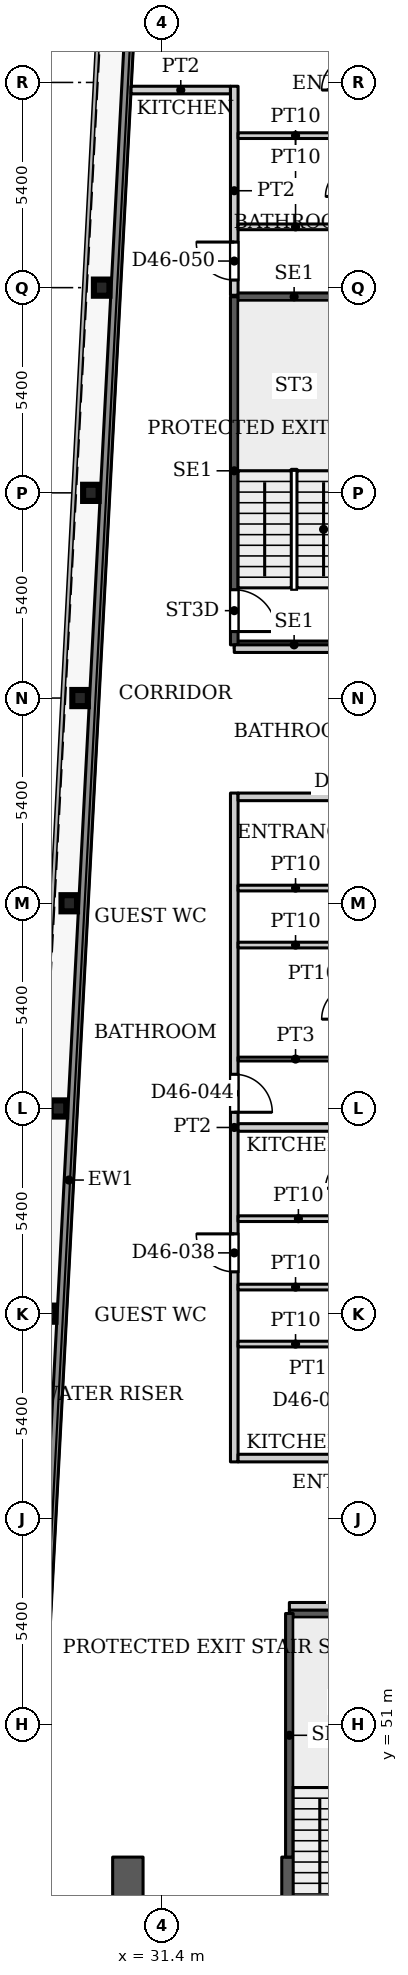
"""IFC4 building model, lengths in metres.
Left out: names, types, materials, properties, quantities, classifications, styles, units other than length and angle.
Written with IfcOpenShell. Run it as: python <this file> out.ifc"""

import sys

from ifc_helpers import new_model, si_unit, direction, frame, frame_2d, origin, origin_2d, place, context, subcontext, project, spatial, rectangle, i_section, extrude, source, transform, mapped, element, fill, save


model = new_model("IFC4")
c1 = context("Model", 3, precision=1e-05, world=origin(), true_north=direction((0.0, 1.0)))
c2 = subcontext(c1, "Body", "Model", "MODEL_VIEW")
j1 = project(units=[si_unit("LENGTHUNIT", "METRE"), si_unit("PLANEANGLEUNIT", "RADIAN")], contexts=[c1])
p1 = place(None, origin())
s1 = spatial("IfcSite", under=j1, at=p1, CompositionType="ELEMENT")
p2 = place(p1, origin())
s2 = spatial("IfcBuilding", under=s1, at=p2, CompositionType="ELEMENT")
p3 = place(p2, frame((0.0, 0.0, 195.5)))
s3 = spatial("IfcBuildingStorey", under=s2, at=p3, CompositionType="ELEMENT", Elevation=195.5)
for number, where, z_axis, x_axis in (
    (1, (28.39, 61.8, 0.0), (0.0, 0.0, 1.0), (1.0, 0.0, 0.0)),
    (2, (28.674, 67.2, 0.0), (0.0, 0.0, 1.0), (1.0, 0.0, 0.0)),
    (3, (28.958, 72.6, 0.0), (0.0, 0.0, 1.0), (1.0, 0.0, 0.0)),
    (4, (29.243, 78.0, 0.0), (0.0, 0.0, 1.0), (1.0, 0.0, 0.0)),
    (5, (29.527, 83.4, 0.0), (0.0, 0.0, 1.0), (1.0, 0.0, 0.0)),
    (6, (29.811, 88.8, 0.0), (0.0, 0.0, 1.0), (1.0, 0.0, 0.0)),
):
    element("IfcColumn", number, at=place(p3, frame(where, z_axis=z_axis, x_axis=x_axis)), inside=s3, PredefinedType="COLUMN", context=c2, shape_type="SweptSolid", body=[
        extrude(i_section(OverallWidth=0.409, OverallDepth=0.425, WebThickness=0.033, FlangeThickness=0.052, FilletRadius=0.013, at=origin_2d()), origin(), (0.0, 0.0, 1.0), 3.9),
    ])
p4 = place(p3, frame((34.75, 29.05, 0.0), z_axis=(0.0, 0.0, 1.0), x_axis=(0.0, 1.0, 0.0)))
e7 = element("IfcWall", 7, at=p4, inside=s3, PredefinedType="SHEAR", context=c2, shape_type="SweptSolid", body=[
    extrude(rectangle(XDim=18.45, YDim=0.4, at=frame_2d((9.225, 0.0))), origin(), (0.0, 0.0, 1.0), 3.9),
])
p5 = place(p4, frame((8.025, 0.0, 0.0)))
e8 = element("IfcOpeningElement", 8, at=p5, cuts=e7, PredefinedType="OPENING", context=c2, shape_type="SweptSolid", body=[
    extrude(rectangle(XDim=1.1, YDim=2.2, at=frame_2d((0.55, 1.1))), frame((0.0, 0.21, 0.0), z_axis=(0.0, -1.0, 0.0), x_axis=(1.0, 0.0, 0.0)), (0.0, 0.0, 1.0), 0.42),
])
p6 = place(p4, frame((10.875, 0.0, 0.0)))
e9 = element("IfcOpeningElement", 9, at=p6, cuts=e7, PredefinedType="OPENING", context=c2, shape_type="SweptSolid", body=[
    extrude(rectangle(XDim=1.1, YDim=2.2, at=frame_2d((0.55, 1.1))), frame((0.0, 0.21, 0.0), z_axis=(0.0, -1.0, 0.0), x_axis=(1.0, 0.0, 0.0)), (0.0, 0.0, 1.0), 0.42),
])
p7 = place(p4, frame((13.725, 0.0, 0.0)))
e10 = element("IfcOpeningElement", 10, at=p7, cuts=e7, PredefinedType="OPENING", context=c2, shape_type="SweptSolid", body=[
    extrude(rectangle(XDim=1.1, YDim=2.2, at=frame_2d((0.55, 1.1))), frame((0.0, 0.21, 0.0), z_axis=(0.0, -1.0, 0.0), x_axis=(1.0, 0.0, 0.0)), (0.0, 0.0, 1.0), 0.42),
])
p8 = place(p4, frame((15.95, 0.0, 0.0)))
e11 = element("IfcOpeningElement", 11, at=p8, cuts=e7, PredefinedType="OPENING", context=c2, shape_type="SweptSolid", body=[
    extrude(rectangle(XDim=1.1, YDim=2.2, at=frame_2d((0.55, 1.1))), frame((0.0, 0.21, 0.0), z_axis=(0.0, -1.0, 0.0), x_axis=(1.0, 0.0, 0.0)), (0.0, 0.0, 1.0), 0.42),
])
p9 = place(p3, frame((30.5, 29.05, 0.0), z_axis=(0.0, 0.0, 1.0), x_axis=(0.0, 1.0, 0.0)))
e12 = element("IfcWall", 12, at=p9, inside=s3, PredefinedType="SHEAR", context=c2, shape_type="SweptSolid", body=[
    extrude(rectangle(XDim=18.45, YDim=0.8, at=frame_2d((9.225, 0.0))), origin(), (0.0, 0.0, 1.0), 3.9),
])
p10 = place(p9, frame((1.5, 0.0, 0.0)))
e13 = element("IfcOpeningElement", 13, at=p10, cuts=e12, PredefinedType="OPENING", context=c2, shape_type="SweptSolid", body=[
    extrude(rectangle(XDim=0.9, YDim=2.2, at=frame_2d((0.45, 1.1))), frame((0.0, 0.41, 0.0), z_axis=(0.0, -1.0, 0.0), x_axis=(1.0, 0.0, 0.0)), (0.0, 0.0, 1.0), 0.82),
])
p11 = place(p9, frame((8.705, 0.0, 0.0)))
e14 = element("IfcOpeningElement", 14, at=p11, cuts=e12, PredefinedType="OPENING", context=c2, shape_type="SweptSolid", body=[
    extrude(rectangle(XDim=0.9, YDim=2.2, at=frame_2d((0.45, 1.1))), frame((0.0, 0.41, 0.0), z_axis=(0.0, -1.0, 0.0), x_axis=(1.0, 0.0, 0.0)), (0.0, 0.0, 1.0), 0.82),
])
p12 = place(p3, frame((27.195, 31.969, 0.0), z_axis=(0.0, 0.0, 1.0), x_axis=(0.052554995867, 0.998618031286, 0.0)))
e15 = element("IfcWall", 15, at=p12, inside=s3, PredefinedType="SOLIDWALL", context=c2, shape_type="SweptSolid", body=[
    extrude(rectangle(XDim=66.787, YDim=0.25, at=frame_2d((33.394, 0.0))), origin(), (0.0, 0.0, 1.0), 3.75),
])
p13 = place(p3, frame((34.75, 53.91, 0.0), z_axis=(0.0, 0.0, 1.0), x_axis=(1.0, 0.0, 0.0)))
e16 = element("IfcWall", 16, at=p13, inside=s3, PredefinedType="SHEAR", context=c2, shape_type="SweptSolid", body=[
    extrude(rectangle(XDim=3.15, YDim=0.2, at=frame_2d((1.575, 0.0))), origin(), (0.0, 0.0, 1.0), 3.9),
])
p14 = place(p3, frame((34.75, 47.5, 0.0), z_axis=(0.0, 0.0, 1.0), x_axis=(0.0, 1.0, 0.0)))
e17 = element("IfcWall", 17, at=p14, inside=s3, PredefinedType="SHEAR", context=c2, shape_type="SweptSolid", body=[
    extrude(rectangle(XDim=6.41, YDim=0.2, at=frame_2d((3.205, 0.0))), origin(), (0.0, 0.0, 1.0), 3.9),
])
for number, where, z_axis, x_axis in (
    (18, (33.3, 79.4, 0.0), (0.0, 0.0, 1.0), (1.0, 0.0, 0.0)),
    (19, (33.3, 88.56, 0.0), (0.0, 0.0, 1.0), (1.0, 0.0, 0.0)),
):
    element("IfcWall", number, at=place(p3, frame(where, z_axis=z_axis, x_axis=x_axis)), inside=s3, PredefinedType="SHEAR", context=c2, shape_type="SweptSolid", body=[
        extrude(rectangle(XDim=3.15, YDim=0.2, at=frame_2d((1.575, 0.0))), origin(), (0.0, 0.0, 1.0), 3.9),
    ])
p15 = place(p3, frame((33.3, 79.4, 0.0), z_axis=(0.0, 0.0, 1.0), x_axis=(0.0, 1.0, 0.0)))
e20 = element("IfcWall", 20, at=p15, inside=s3, PredefinedType="SHEAR", context=c2, shape_type="SweptSolid", body=[
    extrude(rectangle(XDim=9.16, YDim=0.2, at=frame_2d((4.58, 0.0))), origin(), (0.0, 0.0, 1.0), 3.9),
])
p16 = place(p15, frame((0.35, 0.0, 0.0)))
e21 = element("IfcOpeningElement", 21, at=p16, cuts=e20, PredefinedType="OPENING", context=c2, shape_type="SweptSolid", body=[
    extrude(rectangle(XDim=1.1, YDim=2.2, at=frame_2d((0.55, 1.1))), frame((0.0, 0.11, 0.0), z_axis=(0.0, -1.0, 0.0), x_axis=(1.0, 0.0, 0.0)), (0.0, 0.0, 1.0), 0.22),
])
p17 = place(p3, frame((30.585, 94.0, 0.0), z_axis=(0.0, 0.0, 1.0), x_axis=(1.0, 0.0, 0.0)))
e22 = element("IfcWall", 22, at=p17, inside=s3, PredefinedType="PARTITIONING", context=c2, shape_type="SweptSolid", body=[
    extrude(rectangle(XDim=2.615, YDim=0.2, at=frame_2d((1.308, 0.0))), origin(), (0.0, 0.0, 1.0), 3.6),
])
p18 = place(p3, frame((33.3, 57.9, 0.0), z_axis=(0.0, 0.0, 1.0), x_axis=(0.0, 1.0, 0.0)))
e23 = element("IfcWall", 23, at=p18, inside=s3, PredefinedType="PARTITIONING", context=c2, shape_type="SweptSolid", body=[
    extrude(rectangle(XDim=17.6, YDim=0.2, at=frame_2d((8.8, 0.0))), origin(), (0.0, 0.0, 1.0), 3.6),
])
p19 = place(p18, frame((5.0, 0.0, 0.0)))
e24 = element("IfcOpeningElement", 24, at=p19, cuts=e23, PredefinedType="OPENING", context=c2, shape_type="SweptSolid", body=[
    extrude(rectangle(XDim=1.0, YDim=2.1, at=frame_2d((0.5, 1.05))), frame((0.0, 0.11, 0.0), z_axis=(0.0, -1.0, 0.0), x_axis=(1.0, 0.0, 0.0)), (0.0, 0.0, 1.0), 0.22),
])
p20 = place(p18, frame((9.2, 0.0, 0.0)))
e25 = element("IfcOpeningElement", 25, at=p20, cuts=e23, PredefinedType="OPENING", context=c2, shape_type="SweptSolid", body=[
    extrude(rectangle(XDim=1.0, YDim=2.1, at=frame_2d((0.5, 1.05))), frame((0.0, 0.11, 0.0), z_axis=(0.0, -1.0, 0.0), x_axis=(1.0, 0.0, 0.0)), (0.0, 0.0, 1.0), 0.22),
])
p21 = place(p3, frame((33.3, 79.3, 0.0), z_axis=(0.0, 0.0, 1.0), x_axis=(1.0, 0.0, 0.0)))
e26 = element("IfcWall", 26, at=p21, inside=s3, PredefinedType="PARTITIONING", context=c2, shape_type="SweptSolid", body=[
    extrude(rectangle(XDim=12.6, YDim=0.2, at=frame_2d((6.3, 0.0))), origin(), (0.0, 0.0, 1.0), 3.6),
])
p22 = place(p21, frame((5.795, 0.0, 0.0)))
e27 = element("IfcOpeningElement", 27, at=p22, cuts=e26, PredefinedType="OPENING", context=c2, shape_type="SweptSolid", body=[
    extrude(rectangle(XDim=1.0, YDim=2.1, at=frame_2d((0.5, 1.05))), frame((0.0, 0.11, 0.0), z_axis=(0.0, -1.0, 0.0), x_axis=(1.0, 0.0, 0.0)), (0.0, 0.0, 1.0), 0.22),
])
p23 = place(p3, frame((33.3, 88.6, 0.0), z_axis=(0.0, 0.0, 1.0), x_axis=(0.0, 1.0, 0.0)))
e28 = element("IfcWall", 28, at=p23, inside=s3, PredefinedType="PARTITIONING", context=c2, shape_type="SweptSolid", body=[
    extrude(rectangle(XDim=5.5, YDim=0.2, at=frame_2d((2.75, 0.0))), origin(), (0.0, 0.0, 1.0), 3.6),
])
p24 = place(p23, frame((0.4, 0.0, 0.0)))
e29 = element("IfcOpeningElement", 29, at=p24, cuts=e28, PredefinedType="OPENING", context=c2, shape_type="SweptSolid", body=[
    extrude(rectangle(XDim=1.0, YDim=2.1, at=frame_2d((0.5, 1.05))), frame((0.0, 0.11, 0.0), z_axis=(0.0, -1.0, 0.0), x_axis=(1.0, 0.0, 0.0)), (0.0, 0.0, 1.0), 0.22),
])
p25 = place(p3, frame((33.4, 58.0, 0.0), z_axis=(0.0, 0.0, 1.0), x_axis=(1.0, 0.0, 0.0)))
e30 = element("IfcWall", 30, at=p25, inside=s3, PredefinedType="PARTITIONING", context=c2, shape_type="SweptSolid", body=[
    extrude(rectangle(XDim=12.5, YDim=0.2, at=frame_2d((6.25, 0.0))), origin(), (0.0, 0.0, 1.0), 3.6),
])
for number, where, z_axis, x_axis in (
    (31, (33.4, 61.0, 0.0), (0.0, 0.0, 1.0), (1.0, 0.0, 0.0)),
    (32, (33.4, 62.5, 0.0), (0.0, 0.0, 1.0), (1.0, 0.0, 0.0)),
):
    element("IfcWall", number, at=place(p3, frame(where, z_axis=z_axis, x_axis=x_axis)), inside=s3, PredefinedType="PARTITIONING", context=c2, shape_type="SweptSolid", body=[
        extrude(rectangle(XDim=3.025, YDim=0.15, at=frame_2d((1.513, 0.0))), origin(), (0.0, 0.0, 1.0), 3.6),
    ])
p26 = place(p3, frame((33.4, 64.3, 0.0), z_axis=(0.0, 0.0, 1.0), x_axis=(1.0, 0.0, 0.0)))
e33 = element("IfcWall", 33, at=p26, inside=s3, PredefinedType="PARTITIONING", context=c2, shape_type="SweptSolid", body=[
    extrude(rectangle(XDim=3.175, YDim=0.15, at=frame_2d((1.587, 0.0))), origin(), (0.0, 0.0, 1.0), 3.6),
])
p27 = place(p3, frame((33.4, 66.7, 0.0), z_axis=(0.0, 0.0, 1.0), x_axis=(1.0, 0.0, 0.0)))
e34 = element("IfcWall", 34, at=p27, inside=s3, PredefinedType="PARTITIONING", context=c2, shape_type="SweptSolid", body=[
    extrude(rectangle(XDim=12.5, YDim=0.2, at=frame_2d((6.25, 0.0))), origin(), (0.0, 0.0, 1.0), 3.6),
])
p28 = place(p3, frame((33.4, 68.5, 0.0), z_axis=(0.0, 0.0, 1.0), x_axis=(1.0, 0.0, 0.0)))
e35 = element("IfcWall", 35, at=p28, inside=s3, PredefinedType="PARTITIONING", context=c2, shape_type="SweptSolid", body=[
    extrude(rectangle(XDim=3.025, YDim=0.1, at=frame_2d((1.513, 0.0))), origin(), (0.0, 0.0, 1.0), 3.6),
])
for number, where, z_axis, x_axis in (
    (36, (33.4, 71.5, 0.0), (0.0, 0.0, 1.0), (1.0, 0.0, 0.0)),
    (37, (33.4, 73.0, 0.0), (0.0, 0.0, 1.0), (1.0, 0.0, 0.0)),
):
    element("IfcWall", number, at=place(p3, frame(where, z_axis=z_axis, x_axis=x_axis)), inside=s3, PredefinedType="PARTITIONING", context=c2, shape_type="SweptSolid", body=[
        extrude(rectangle(XDim=3.025, YDim=0.15, at=frame_2d((1.513, 0.0))), origin(), (0.0, 0.0, 1.0), 3.6),
    ])
p29 = place(p3, frame((33.4, 75.4, 0.0), z_axis=(0.0, 0.0, 1.0), x_axis=(1.0, 0.0, 0.0)))
e38 = element("IfcWall", 38, at=p29, inside=s3, PredefinedType="PARTITIONING", context=c2, shape_type="SweptSolid", body=[
    extrude(rectangle(XDim=12.5, YDim=0.2, at=frame_2d((6.25, 0.0))), origin(), (0.0, 0.0, 1.0), 3.6),
])
for number, where, z_axis, x_axis in (
    (39, (33.4, 90.4, 0.0), (0.0, 0.0, 1.0), (1.0, 0.0, 0.0)),
    (40, (33.4, 92.8, 0.0), (0.0, 0.0, 1.0), (1.0, 0.0, 0.0)),
):
    element("IfcWall", number, at=place(p3, frame(where, z_axis=z_axis, x_axis=x_axis)), inside=s3, PredefinedType="PARTITIONING", context=c2, shape_type="SweptSolid", body=[
        extrude(rectangle(XDim=3.025, YDim=0.15, at=frame_2d((1.513, 0.0))), origin(), (0.0, 0.0, 1.0), 3.6),
    ])
p30 = place(p3, frame((34.75, 54.1, 0.0), z_axis=(0.0, 0.0, 1.0), x_axis=(1.0, 0.0, 0.0)))
e41 = element("IfcWall", 41, at=p30, inside=s3, PredefinedType="PARTITIONING", context=c2, shape_type="SweptSolid", body=[
    extrude(rectangle(XDim=11.15, YDim=0.2, at=frame_2d((5.575, 0.0))), origin(), (0.0, 0.0, 1.0), 3.6),
])
p31 = place(p30, frame((5.075, 0.0, 0.0)))
e42 = element("IfcOpeningElement", 42, at=p31, cuts=e41, PredefinedType="OPENING", context=c2, shape_type="SweptSolid", body=[
    extrude(rectangle(XDim=1.0, YDim=2.1, at=frame_2d((0.5, 1.05))), frame((0.0, 0.11, 0.0), z_axis=(0.0, -1.0, 0.0), x_axis=(1.0, 0.0, 0.0)), (0.0, 0.0, 1.0), 0.22),
])
m1 = source(origin(), c2, "Body", "SweptSolid", [
    extrude(rectangle(XDim=1.1, YDim=2.2, at=frame_2d((0.55, 1.1))), frame((0.0, 0.025, 0.0), z_axis=(0.0, -1.0, 0.0), x_axis=(1.0, 0.0, 0.0)), (0.0, 0.0, 1.0), 0.05),
])
p32 = place(p16, origin())
e43 = element("IfcDoor", 43, at=p32, inside=s3, OperationType="SINGLE_SWING_RIGHT", PredefinedType="DOOR", context=c2, shape_type="MappedRepresentation", body=[
    mapped(m1, transform((0.0, 0.0, 0.0), x_axis=(1.0, 0.0, 0.0), y_axis=(0.0, 1.0, 0.0), z_axis=(0.0, 0.0, 1.0), scale=1.0)),
])
fill(e21, e43)
m2 = source(origin(), c2, "Body", "SweptSolid", [
    extrude(rectangle(XDim=1.0, YDim=2.1, at=frame_2d((0.5, 1.05))), frame((0.0, 0.025, 0.0), z_axis=(0.0, -1.0, 0.0), x_axis=(1.0, 0.0, 0.0)), (0.0, 0.0, 1.0), 0.05),
])
p33 = place(p19, origin())
e44 = element("IfcDoor", 44, at=p33, inside=s3, OperationType="SINGLE_SWING_LEFT", PredefinedType="DOOR", context=c2, shape_type="MappedRepresentation", body=[
    mapped(m2, transform((0.0, 0.0, 0.0), x_axis=(1.0, 0.0, 0.0), y_axis=(0.0, 1.0, 0.0), z_axis=(0.0, 0.0, 1.0), scale=1.0)),
])
fill(e24, e44)
p34 = place(p20, origin())
e45 = element("IfcDoor", 45, at=p34, inside=s3, OperationType="SINGLE_SWING_RIGHT", PredefinedType="DOOR", context=c2, shape_type="MappedRepresentation", body=[
    mapped(m2, transform((0.0, 0.0, 0.0), x_axis=(1.0, 0.0, 0.0), y_axis=(0.0, 1.0, 0.0), z_axis=(0.0, 0.0, 1.0), scale=1.0)),
])
fill(e25, e45)
p35 = place(p24, origin())
e46 = element("IfcDoor", 46, at=p35, inside=s3, OperationType="SINGLE_SWING_LEFT", PredefinedType="DOOR", context=c2, shape_type="MappedRepresentation", body=[
    mapped(m2, transform((0.0, 0.0, 0.0), x_axis=(1.0, 0.0, 0.0), y_axis=(0.0, 1.0, 0.0), z_axis=(0.0, 0.0, 1.0), scale=1.0)),
])
fill(e29, e46)
save(model, sys.argv[1])
